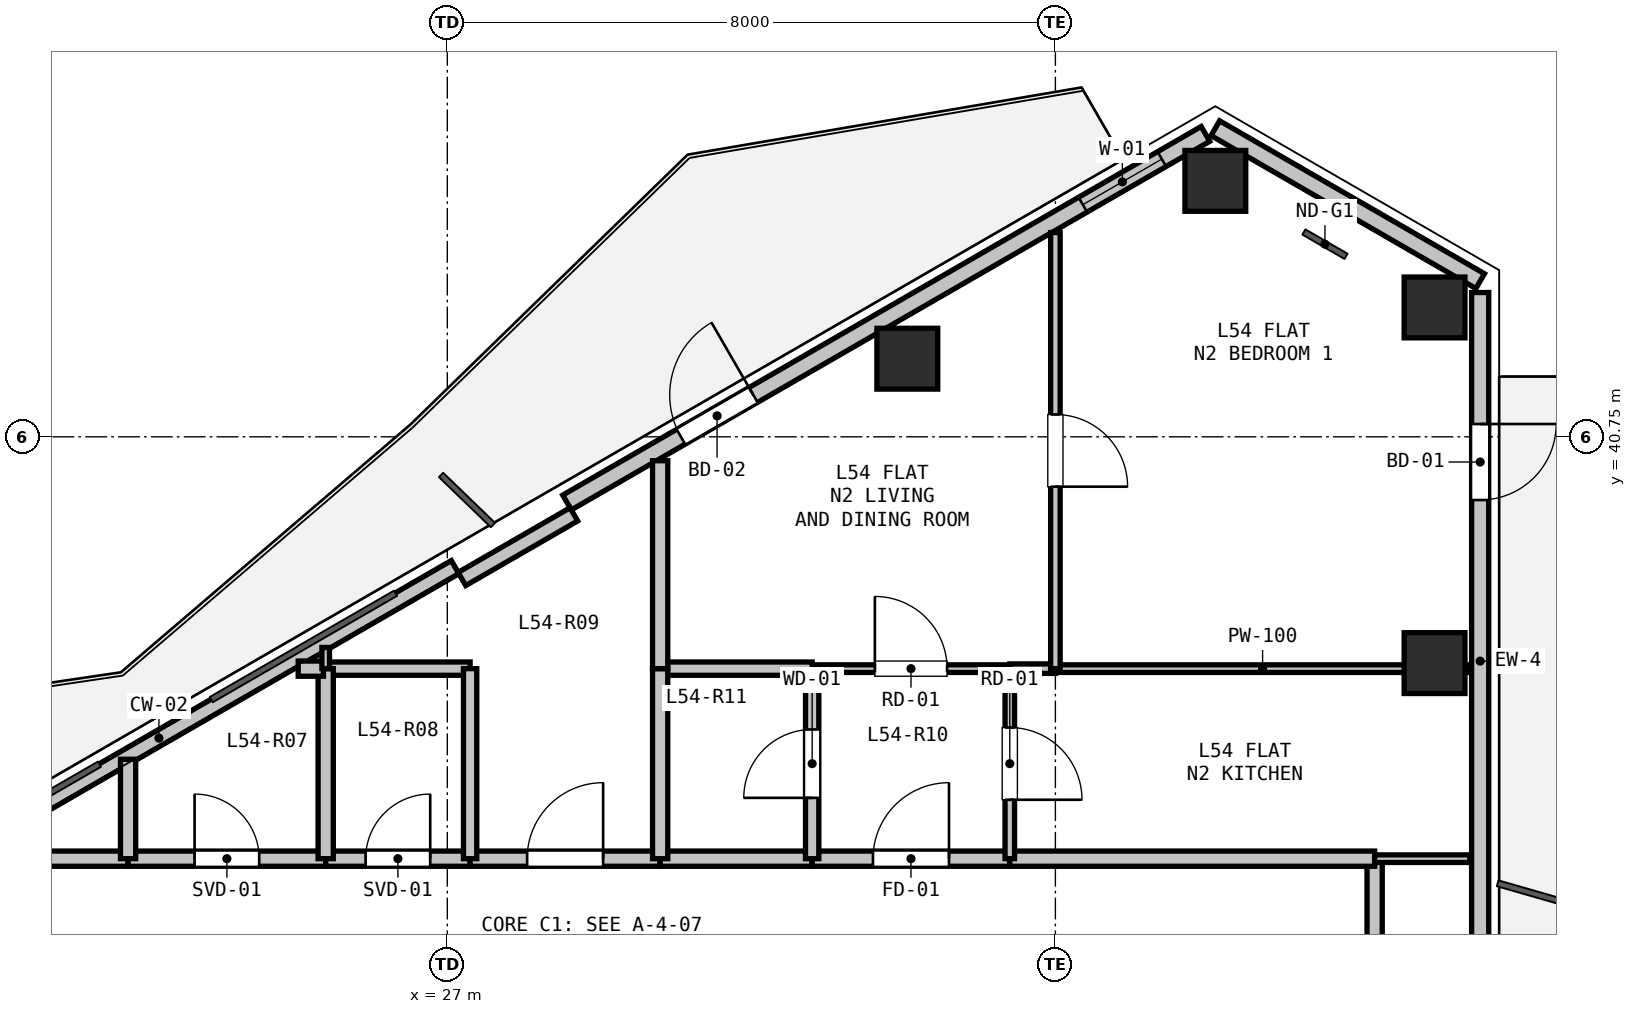
"""IFC4 building model, lengths in metres.
Left out: names, types, materials, properties, quantities, classifications, styles, units other than length and angle.
Written with IfcOpenShell. Run it as: python <this file> out.ifc"""

import sys

from ifc_helpers import new_model, si_unit, direction, frame, frame_2d, origin, origin_2d, place, context, subcontext, project, spatial, rectangle, hollow_rectangle, extrude, element, fill, save


model = new_model("IFC4")
c1 = context("Model", 3, precision=1e-05, world=origin(), true_north=direction((0.0, 1.0)))
c2 = subcontext(c1, "Body", "Model", "MODEL_VIEW")
j1 = project(units=[si_unit("LENGTHUNIT", "METRE"), si_unit("PLANEANGLEUNIT", "RADIAN")], contexts=[c1])
p1 = place(None, origin())
s1 = spatial("IfcSite", under=j1, at=p1, CompositionType="ELEMENT")
p2 = place(p1, origin())
s2 = spatial("IfcBuilding", under=s1, at=p2, CompositionType="ELEMENT")
p3 = place(p2, frame((0.0, 0.0, 195.3)))
s3 = spatial("IfcBuildingStorey", under=s2, at=p3, CompositionType="ELEMENT", Elevation=195.3)
for number, where, z_axis, x_axis in (
    (1, (33.052, 41.778, 0.0), (0.0, 0.0, 1.0), (1.0, 0.0, 0.0)),
    (2, (37.104, 44.117, 0.0), (0.0, 0.0, 1.0), (1.0, 0.0, 0.0)),
    (3, (39.988, 42.452, 0.0), (0.0, 0.0, 1.0), (1.0, 0.0, 0.0)),
    (4, (39.988, 37.773, 0.0), (0.0, 0.0, 1.0), (1.0, 0.0, 0.0)),
):
    element("IfcColumn", number, at=place(p3, frame(where, z_axis=z_axis, x_axis=x_axis)), inside=s3, PredefinedType="COLUMN", context=c2, shape_type="SweptSolid", body=[
        extrude(hollow_rectangle(XDim=0.8, YDim=0.8, WallThickness=0.025, at=origin_2d()), origin(), (0.0, 0.0, 1.0), 3.3),
    ])
p4 = place(p3, frame((37.104, 44.81, 0.0), z_axis=(0.0, 0.0, 1.0), x_axis=(0.866023907196, -0.500002592159, 0.0)))
e5 = element("IfcWall", 5, at=p4, inside=s3, PredefinedType="SOLIDWALL", context=c2, shape_type="SweptSolid", body=[
    extrude(rectangle(XDim=4.023, YDim=0.225, at=frame_2d((2.012, 0.0))), origin(), (0.0, 0.0, 1.0), 2.69),
])
p5 = place(p3, frame((19.309, 34.536, 0.0), z_axis=(0.0, 0.0, 1.0), x_axis=(0.866020680503, 0.500008180874, 0.0)))
e6 = element("IfcWall", 6, at=p5, inside=s3, PredefinedType="PARAPET", context=c2, shape_type="SweptSolid", body=[
    extrude(rectangle(XDim=8.999, YDim=0.2, at=frame_2d((4.5, 0.0))), origin(), (0.0, 0.0, 1.0), 0.2),
])
p6 = place(p3, frame((28.575, 39.885, 0.0), z_axis=(0.0, 0.0, 1.0), x_axis=(0.866016233231, 0.500015883528, 0.0)))
e7 = element("IfcWall", 7, at=p6, inside=s3, PredefinedType="SOLIDWALL", context=c2, shape_type="SweptSolid", body=[
    extrude(rectangle(XDim=9.699, YDim=0.225, at=frame_2d((4.85, 0.0))), origin(), (0.0, 0.0, 1.0), 2.69),
])
p7 = place(p6, frame((1.73, 0.0, 0.0)))
e8 = element("IfcOpeningElement", 8, at=p7, cuts=e7, PredefinedType="OPENING", context=c2, shape_type="SweptSolid", body=[
    extrude(rectangle(XDim=1.1, YDim=2.1, at=frame_2d((0.55, 1.05))), frame((0.0, 0.123, 0.0), z_axis=(0.0, -1.0, 0.0), x_axis=(1.0, 0.0, 0.0)), (0.0, 0.0, 1.0), 0.245),
])
p8 = place(p6, frame((7.836, 0.0, 0.9)))
e9 = element("IfcOpeningElement", 9, at=p8, cuts=e7, PredefinedType="OPENING", context=c2, shape_type="SweptSolid", body=[
    extrude(rectangle(XDim=1.2, YDim=1.4, at=frame_2d((0.6, 0.7))), frame((0.0, 0.123, 0.0), z_axis=(0.0, -1.0, 0.0), x_axis=(1.0, 0.0, 0.0)), (0.0, 0.0, 1.0), 0.245),
])
p9 = place(p3, frame((27.192, 38.88, 0.0), z_axis=(0.0, 0.0, 1.0), x_axis=(0.866025371046, 0.500000056704, 0.0)))
e10 = element("IfcWall", 10, at=p9, inside=s3, PredefinedType="PARAPET", context=c2, shape_type="SweptSolid", body=[
    extrude(rectangle(XDim=1.7, YDim=0.2, at=frame_2d((0.85, 0.0))), origin(), (0.0, 0.0, 1.0), 2.69),
])
p10 = place(p3, frame((40.588, 42.648, 0.0), z_axis=(0.0, 0.0, 1.0), x_axis=(0.0, -1.0, 0.0)))
e11 = element("IfcWall", 11, at=p10, inside=s3, PredefinedType="SOLIDWALL", context=c2, shape_type="SweptSolid", body=[
    extrude(rectangle(XDim=9.699, YDim=0.225, at=frame_2d((4.85, 0.0))), origin(), (0.0, 0.0, 1.0), 2.69),
])
p11 = place(p10, frame((1.73, 0.0, 0.0)))
e12 = element("IfcOpeningElement", 12, at=p11, cuts=e11, PredefinedType="OPENING", context=c2, shape_type="SweptSolid", body=[
    extrude(rectangle(XDim=1.0, YDim=2.1, at=frame_2d((0.5, 1.05))), frame((0.0, 0.123, 0.0), z_axis=(0.0, -1.0, 0.0), x_axis=(1.0, 0.0, 0.0)), (0.0, 0.0, 1.0), 0.245),
])
p12 = place(p3, frame((39.2, 35.2, 0.0), z_axis=(0.0, 0.0, 1.0), x_axis=(0.0, -1.0, 0.0)))
e13 = element("IfcWall", 13, at=p12, inside=s3, PredefinedType="PARTITIONING", context=c2, shape_type="SweptSolid", body=[
    extrude(rectangle(XDim=1.6, YDim=0.2, at=frame_2d((0.8, 0.0))), origin(), (0.0, 0.0, 1.0), 3.07),
])
p13 = place(p3, frame((20.528, 35.2, 0.0), z_axis=(0.0, 0.0, 1.0), x_axis=(1.0, 0.0, 0.0)))
e14 = element("IfcWall", 14, at=p13, inside=s3, PredefinedType="PARTITIONING", context=c2, shape_type="SweptSolid", body=[
    extrude(rectangle(XDim=2.272, YDim=0.2, at=frame_2d((1.136, 0.0))), origin(), (0.0, 0.0, 1.0), 2.365),
])
p14 = place(p3, frame((22.8, 35.2, 0.0), z_axis=(0.0, 0.0, 1.0), x_axis=(1.0, 0.0, 0.0)))
e15 = element("IfcWall", 15, at=p14, inside=s3, PredefinedType="PARTITIONING", context=c2, shape_type="SweptSolid", body=[
    extrude(rectangle(XDim=2.6, YDim=0.2, at=frame_2d((1.3, 0.0))), origin(), (0.0, 0.0, 1.0), 3.07),
])
p15 = place(p14, frame((0.875, 0.0, 0.0)))
e16 = element("IfcOpeningElement", 16, at=p15, cuts=e15, PredefinedType="OPENING", context=c2, shape_type="SweptSolid", body=[
    extrude(rectangle(XDim=0.85, YDim=2.1, at=frame_2d((0.425, 1.05))), frame((0.0, 0.11, 0.0), z_axis=(0.0, -1.0, 0.0), x_axis=(1.0, 0.0, 0.0)), (0.0, 0.0, 1.0), 0.22),
])
p16 = place(p3, frame((25.4, 35.2, 0.0), z_axis=(0.0, 0.0, 1.0), x_axis=(1.0, 0.0, 0.0)))
e17 = element("IfcWall", 17, at=p16, inside=s3, PredefinedType="PARTITIONING", context=c2, shape_type="SweptSolid", body=[
    extrude(rectangle(XDim=1.9, YDim=0.2, at=frame_2d((0.95, 0.0))), origin(), (0.0, 0.0, 1.0), 3.07),
])
p17 = place(p16, frame((0.525, 0.0, 0.0)))
e18 = element("IfcOpeningElement", 18, at=p17, cuts=e17, PredefinedType="OPENING", context=c2, shape_type="SweptSolid", body=[
    extrude(rectangle(XDim=0.85, YDim=2.1, at=frame_2d((0.425, 1.05))), frame((0.0, 0.11, 0.0), z_axis=(0.0, -1.0, 0.0), x_axis=(1.0, 0.0, 0.0)), (0.0, 0.0, 1.0), 0.22),
])
p18 = place(p3, frame((27.3, 35.2, 0.0), z_axis=(0.0, 0.0, 1.0), x_axis=(1.0, 0.0, 0.0)))
e19 = element("IfcWall", 19, at=p18, inside=s3, PredefinedType="PARTITIONING", context=c2, shape_type="SweptSolid", body=[
    extrude(rectangle(XDim=2.5, YDim=0.2, at=frame_2d((1.25, 0.0))), origin(), (0.0, 0.0, 1.0), 3.07),
])
p19 = place(p18, frame((0.75, 0.0, 0.0)))
e20 = element("IfcOpeningElement", 20, at=p19, cuts=e19, PredefinedType="OPENING", context=c2, shape_type="SweptSolid", body=[
    extrude(rectangle(XDim=1.0, YDim=2.15, at=frame_2d((0.5, 1.075))), frame((0.0, 0.11, 0.0), z_axis=(0.0, -1.0, 0.0), x_axis=(1.0, 0.0, 0.0)), (0.0, 0.0, 1.0), 0.22),
])
p20 = place(p3, frame((29.8, 35.2, 0.0), z_axis=(0.0, 0.0, 1.0), x_axis=(1.0, 0.0, 0.0)))
e21 = element("IfcWall", 21, at=p20, inside=s3, PredefinedType="PARTITIONING", context=c2, shape_type="SweptSolid", body=[
    extrude(rectangle(XDim=2.0, YDim=0.2, at=frame_2d((1.0, 0.0))), origin(), (0.0, 0.0, 1.0), 3.07),
])
p21 = place(p3, frame((31.8, 35.2, 0.0), z_axis=(0.0, 0.0, 1.0), x_axis=(1.0, 0.0, 0.0)))
e22 = element("IfcWall", 22, at=p21, inside=s3, PredefinedType="PARTITIONING", context=c2, shape_type="SweptSolid", body=[
    extrude(rectangle(XDim=2.6, YDim=0.2, at=frame_2d((1.3, 0.0))), origin(), (0.0, 0.0, 1.0), 3.07),
])
p22 = place(p21, frame((0.8, 0.0, 0.0)))
e23 = element("IfcOpeningElement", 23, at=p22, cuts=e22, PredefinedType="OPENING", context=c2, shape_type="SweptSolid", body=[
    extrude(rectangle(XDim=1.0, YDim=2.15, at=frame_2d((0.5, 1.075))), frame((0.0, 0.11, 0.0), z_axis=(0.0, -1.0, 0.0), x_axis=(1.0, 0.0, 0.0)), (0.0, 0.0, 1.0), 0.22),
])
p23 = place(p3, frame((34.4, 35.2, 0.0), z_axis=(0.0, 0.0, 1.0), x_axis=(1.0, 0.0, 0.0)))
e24 = element("IfcWall", 24, at=p23, inside=s3, PredefinedType="PARTITIONING", context=c2, shape_type="SweptSolid", body=[
    extrude(rectangle(XDim=4.8, YDim=0.2, at=frame_2d((2.4, 0.0))), origin(), (0.0, 0.0, 1.0), 2.518),
])
p24 = place(p3, frame((31.8, 37.7, 0.0), z_axis=(0.0, 0.0, 1.0), x_axis=(1.0, 0.0, 0.0)))
e25 = element("IfcWall", 25, at=p24, inside=s3, PredefinedType="PARTITIONING", context=c2, shape_type="SweptSolid", body=[
    extrude(rectangle(XDim=2.6, YDim=0.1, at=frame_2d((1.3, 0.0))), origin(), (0.0, 0.0, 1.0), 3.07),
])
p25 = place(p24, frame((0.825, 0.0, 0.0)))
e26 = element("IfcOpeningElement", 26, at=p25, cuts=e25, PredefinedType="OPENING", context=c2, shape_type="SweptSolid", body=[
    extrude(rectangle(XDim=0.95, YDim=2.1, at=frame_2d((0.475, 1.05))), frame((0.0, 0.06, 0.0), z_axis=(0.0, -1.0, 0.0), x_axis=(1.0, 0.0, 0.0)), (0.0, 0.0, 1.0), 0.12),
])
p26 = place(p3, frame((34.4, 37.7, 0.0), z_axis=(0.0, 0.0, 1.0), x_axis=(0.0, -1.0, 0.0)))
e27 = element("IfcWall", 27, at=p26, inside=s3, PredefinedType="PARTITIONING", context=c2, shape_type="SweptSolid", body=[
    extrude(rectangle(XDim=2.5, YDim=0.125, at=frame_2d((1.25, 0.0))), origin(), (0.0, 0.0, 1.0), 3.07),
])
p27 = place(p26, frame((0.775, 0.0, 0.0)))
e28 = element("IfcOpeningElement", 28, at=p27, cuts=e27, PredefinedType="OPENING", context=c2, shape_type="SweptSolid", body=[
    extrude(rectangle(XDim=0.95, YDim=2.1, at=frame_2d((0.475, 1.05))), frame((0.0, 0.073, 0.0), z_axis=(0.0, -1.0, 0.0), x_axis=(1.0, 0.0, 0.0)), (0.0, 0.0, 1.0), 0.145),
])
p28 = place(p3, frame((31.8, 35.2, 0.0), z_axis=(0.0, 0.0, 1.0), x_axis=(0.0, 1.0, 0.0)))
e29 = element("IfcWall", 29, at=p28, inside=s3, PredefinedType="PLUMBINGWALL", context=c2, shape_type="SweptSolid", body=[
    extrude(rectangle(XDim=2.5, YDim=0.175, at=frame_2d((1.25, 0.0))), origin(), (0.0, 0.0, 1.0), 3.07),
])
p29 = place(p28, frame((0.8, 0.0, 0.0)))
e30 = element("IfcOpeningElement", 30, at=p29, cuts=e29, PredefinedType="OPENING", context=c2, shape_type="SweptSolid", body=[
    extrude(rectangle(XDim=0.9, YDim=2.1, at=frame_2d((0.45, 1.05))), frame((0.0, 0.097, 0.0), z_axis=(0.0, -1.0, 0.0), x_axis=(1.0, 0.0, 0.0)), (0.0, 0.0, 1.0), 0.195),
])
p30 = place(p3, frame((25.4, 37.7, 0.0), z_axis=(0.0, 0.0, 1.0), x_axis=(1.0, 0.0, 0.0)))
e31 = element("IfcWall", 31, at=p30, inside=s3, PredefinedType="PLUMBINGWALL", context=c2, shape_type="SweptSolid", body=[
    extrude(rectangle(XDim=1.9, YDim=0.175, at=frame_2d((0.95, 0.0))), origin(), (0.0, 0.0, 1.0), 2.365),
])
p31 = place(p3, frame((27.3, 37.7, 0.0), z_axis=(0.0, 0.0, 1.0), x_axis=(0.0, -1.0, 0.0)))
e32 = element("IfcWall", 32, at=p31, inside=s3, PredefinedType="PLUMBINGWALL", context=c2, shape_type="SweptSolid", body=[
    extrude(rectangle(XDim=2.5, YDim=0.175, at=frame_2d((1.25, 0.0))), origin(), (0.0, 0.0, 1.0), 3.07),
])
p32 = place(p3, frame((25.4, 35.2, 0.0), z_axis=(0.0, 0.0, 1.0), x_axis=(0.0, 1.0, 0.0)))
e33 = element("IfcWall", 33, at=p32, inside=s3, PredefinedType="PARTITIONING", context=c2, shape_type="SweptSolid", body=[
    extrude(rectangle(XDim=2.5, YDim=0.2, at=frame_2d((1.25, 0.0))), origin(), (0.0, 0.0, 1.0), 2.365),
])
p33 = place(p3, frame((29.8, 37.7, 0.0), z_axis=(0.0, 0.0, 1.0), x_axis=(1.0, 0.0, 0.0)))
e34 = element("IfcWall", 34, at=p33, inside=s3, PredefinedType="PLUMBINGWALL", context=c2, shape_type="SweptSolid", body=[
    extrude(rectangle(XDim=2.0, YDim=0.175, at=frame_2d((1.0, 0.0))), origin(), (0.0, 0.0, 1.0), 3.07),
])
p34 = place(p3, frame((29.8, 35.2, 0.0), z_axis=(0.0, 0.0, 1.0), x_axis=(0.0, 1.0, 0.0)))
e35 = element("IfcWall", 35, at=p34, inside=s3, PredefinedType="PARTITIONING", context=c2, shape_type="SweptSolid", body=[
    extrude(rectangle(XDim=2.5, YDim=0.2, at=frame_2d((1.25, 0.0))), origin(), (0.0, 0.0, 1.0), 3.07),
])
p35 = place(p3, frame((40.452, 35.2, 0.0), z_axis=(0.0, 0.0, 1.0), x_axis=(-1.0, 0.0, 0.0)))
e36 = element("IfcWall", 36, at=p35, inside=s3, PredefinedType="PARTITIONING", context=c2, shape_type="SweptSolid", body=[
    extrude(rectangle(XDim=1.252, YDim=0.1, at=frame_2d((0.626, 0.0))), origin(), (0.0, 0.0, 1.0), 2.365),
])
p36 = place(p3, frame((34.4, 37.7, 0.0), z_axis=(0.0, 0.0, 1.0), x_axis=(1.0, 0.0, 0.0)))
e37 = element("IfcWall", 37, at=p36, inside=s3, PredefinedType="PARTITIONING", context=c2, shape_type="SweptSolid", body=[
    extrude(rectangle(XDim=0.6, YDim=0.125, at=frame_2d((0.3, 0.0))), origin(), (0.0, 0.0, 1.0), 3.07),
])
p37 = place(p3, frame((35.0, 37.7, 0.0), z_axis=(0.0, 0.0, 1.0), x_axis=(1.0, 0.0, 0.0)))
e38 = element("IfcWall", 38, at=p37, inside=s3, PredefinedType="PARTITIONING", context=c2, shape_type="SweptSolid", body=[
    extrude(rectangle(XDim=5.452, YDim=0.1, at=frame_2d((2.726, 0.0))), origin(), (0.0, 0.0, 1.0), 2.518),
])
p38 = place(p3, frame((25.038, 37.7, 0.0), z_axis=(0.0, 0.0, 1.0), x_axis=(1.0, 0.0, 0.0)))
e39 = element("IfcWall", 39, at=p38, inside=s3, PredefinedType="PARTITIONING", context=c2, shape_type="SweptSolid", body=[
    extrude(rectangle(XDim=0.332, YDim=0.2, at=frame_2d((0.166, 0.0))), origin(), (0.0, 0.0, 1.0), 3.07),
])
p39 = place(p3, frame((22.8, 35.2, 0.0), z_axis=(0.0, 0.0, 1.0), x_axis=(0.0, 1.0, 0.0)))
e40 = element("IfcWall", 40, at=p39, inside=s3, PredefinedType="PARTITIONING", context=c2, shape_type="SweptSolid", body=[
    extrude(rectangle(XDim=1.308, YDim=0.2, at=frame_2d((0.654, 0.0))), origin(), (0.0, 0.0, 1.0), 2.365),
])
p40 = place(p3, frame((29.8, 40.435, 0.0), z_axis=(0.0, 0.0, 1.0), x_axis=(0.0, -1.0, 0.0)))
e41 = element("IfcWall", 41, at=p40, inside=s3, PredefinedType="PARTITIONING", context=c2, shape_type="SweptSolid", body=[
    extrude(rectangle(XDim=2.735, YDim=0.2, at=frame_2d((1.368, 0.0))), origin(), (0.0, 0.0, 1.0), 2.365),
])
p41 = place(p3, frame((25.4, 37.7, 0.0), z_axis=(0.0, 0.0, 1.0), x_axis=(0.0, 1.0, 0.0)))
e42 = element("IfcWall", 42, at=p41, inside=s3, PredefinedType="PARTITIONING", context=c2, shape_type="SweptSolid", body=[
    extrude(rectangle(XDim=0.279, YDim=0.1, at=frame_2d((0.139, 0.0))), origin(), (0.0, 0.0, 1.0), 3.07),
])
p42 = place(p3, frame((35.0, 43.438, 0.0), z_axis=(0.0, 0.0, 1.0), x_axis=(0.0, -1.0, 0.0)))
e43 = element("IfcWall", 43, at=p42, inside=s3, PredefinedType="PARTITIONING", context=c2, shape_type="SweptSolid", body=[
    extrude(rectangle(XDim=5.738, YDim=0.125, at=frame_2d((2.869, 0.0))), origin(), (0.0, 0.0, 1.0), 2.795),
])
p43 = place(p42, frame((2.394, 0.0, 0.0)))
e44 = element("IfcOpeningElement", 44, at=p43, cuts=e43, PredefinedType="OPENING", context=c2, shape_type="SweptSolid", body=[
    extrude(rectangle(XDim=0.95, YDim=2.1, at=frame_2d((0.475, 1.05))), frame((0.0, 0.073, 0.0), z_axis=(0.0, -1.0, 0.0), x_axis=(1.0, 0.0, 0.0)), (0.0, 0.0, 1.0), 0.145),
])
p44 = place(p7, origin())
e45 = element("IfcDoor", 45, at=p44, inside=s3, OperationType="SINGLE_SWING_RIGHT", PredefinedType="DOOR", context=c2, shape_type="SweptSolid", body=[
    extrude(rectangle(XDim=1.1, YDim=2.1, at=frame_2d((0.55, 1.05))), frame((0.0, 0.025, 0.0), z_axis=(0.0, -1.0, 0.0), x_axis=(1.0, 0.0, 0.0)), (0.0, 0.0, 1.0), 0.05),
])
fill(e8, e45)
p45 = place(p8, origin())
e46 = element("IfcWindow", 46, at=p45, inside=s3, PartitioningType="SINGLE_PANEL", PredefinedType="WINDOW", context=c2, shape_type="SweptSolid", body=[
    extrude(rectangle(XDim=1.2, YDim=1.4, at=frame_2d((0.6, 0.7))), frame((0.0, 0.03, 0.0), z_axis=(0.0, -1.0, 0.0), x_axis=(1.0, 0.0, 0.0)), (0.0, 0.0, 1.0), 0.06),
])
fill(e9, e46)
p46 = place(p11, origin())
e47 = element("IfcDoor", 47, at=p46, inside=s3, OperationType="SINGLE_SWING_LEFT", PredefinedType="DOOR", context=c2, shape_type="SweptSolid", body=[
    extrude(rectangle(XDim=1.0, YDim=2.1, at=frame_2d((0.5, 1.05))), frame((0.0, 0.025, 0.0), z_axis=(0.0, -1.0, 0.0), x_axis=(1.0, 0.0, 0.0)), (0.0, 0.0, 1.0), 0.05),
])
fill(e12, e47)
p47 = place(p22, origin())
e48 = element("IfcDoor", 48, at=p47, inside=s3, OperationType="SINGLE_SWING_RIGHT", PredefinedType="DOOR", context=c2, shape_type="SweptSolid", body=[
    extrude(rectangle(XDim=1.0, YDim=2.15, at=frame_2d((0.5, 1.075))), frame((0.0, 0.025, 0.0), z_axis=(0.0, -1.0, 0.0), x_axis=(1.0, 0.0, 0.0)), (0.0, 0.0, 1.0), 0.05),
])
fill(e23, e48)
p48 = place(p17, origin())
e49 = element("IfcDoor", 49, at=p48, inside=s3, OperationType="SINGLE_SWING_RIGHT", PredefinedType="DOOR", context=c2, shape_type="SweptSolid", body=[
    extrude(rectangle(XDim=0.85, YDim=2.1, at=frame_2d((0.425, 1.05))), frame((0.0, 0.025, 0.0), z_axis=(0.0, -1.0, 0.0), x_axis=(1.0, 0.0, 0.0)), (0.0, 0.0, 1.0), 0.05),
])
fill(e18, e49)
p49 = place(p15, origin())
e50 = element("IfcDoor", 50, at=p49, inside=s3, OperationType="SINGLE_SWING_LEFT", PredefinedType="DOOR", context=c2, shape_type="SweptSolid", body=[
    extrude(rectangle(XDim=0.85, YDim=2.1, at=frame_2d((0.425, 1.05))), frame((0.0, 0.025, 0.0), z_axis=(0.0, -1.0, 0.0), x_axis=(1.0, 0.0, 0.0)), (0.0, 0.0, 1.0), 0.05),
])
fill(e16, e50)
p50 = place(p19, origin())
e51 = element("IfcDoor", 51, at=p50, inside=s3, OperationType="SINGLE_SWING_RIGHT", PredefinedType="DOOR", context=c2, shape_type="SweptSolid", body=[
    extrude(rectangle(XDim=1.0, YDim=2.15, at=frame_2d((0.5, 1.075))), frame((0.0, 0.025, 0.0), z_axis=(0.0, -1.0, 0.0), x_axis=(1.0, 0.0, 0.0)), (0.0, 0.0, 1.0), 0.05),
])
fill(e20, e51)
p51 = place(p29, origin())
e52 = element("IfcDoor", 52, at=p51, inside=s3, OperationType="SINGLE_SWING_LEFT", PredefinedType="DOOR", context=c2, shape_type="SweptSolid", body=[
    extrude(rectangle(XDim=0.9, YDim=2.1, at=frame_2d((0.45, 1.05))), frame((0.0, 0.025, 0.0), z_axis=(0.0, -1.0, 0.0), x_axis=(1.0, 0.0, 0.0)), (0.0, 0.0, 1.0), 0.05),
])
fill(e30, e52)
p52 = place(p27, origin())
e53 = element("IfcDoor", 53, at=p52, inside=s3, OperationType="SINGLE_SWING_RIGHT", PredefinedType="DOOR", context=c2, shape_type="SweptSolid", body=[
    extrude(rectangle(XDim=0.95, YDim=2.1, at=frame_2d((0.475, 1.05))), frame((0.0, 0.025, 0.0), z_axis=(0.0, -1.0, 0.0), x_axis=(1.0, 0.0, 0.0)), (0.0, 0.0, 1.0), 0.05),
])
fill(e28, e53)
p53 = place(p25, origin())
e54 = element("IfcDoor", 54, at=p53, inside=s3, OperationType="SINGLE_SWING_LEFT", PredefinedType="DOOR", context=c2, shape_type="SweptSolid", body=[
    extrude(rectangle(XDim=0.95, YDim=2.1, at=frame_2d((0.475, 1.05))), frame((0.0, 0.025, 0.0), z_axis=(0.0, -1.0, 0.0), x_axis=(1.0, 0.0, 0.0)), (0.0, 0.0, 1.0), 0.05),
])
fill(e26, e54)
p54 = place(p43, origin())
e55 = element("IfcDoor", 55, at=p54, inside=s3, OperationType="SINGLE_SWING_RIGHT", PredefinedType="DOOR", context=c2, shape_type="SweptSolid", body=[
    extrude(rectangle(XDim=0.95, YDim=2.1, at=frame_2d((0.475, 1.05))), frame((0.0, 0.025, 0.0), z_axis=(0.0, -1.0, 0.0), x_axis=(1.0, 0.0, 0.0)), (0.0, 0.0, 1.0), 0.05),
])
fill(e44, e55)
save(model, sys.argv[1])
